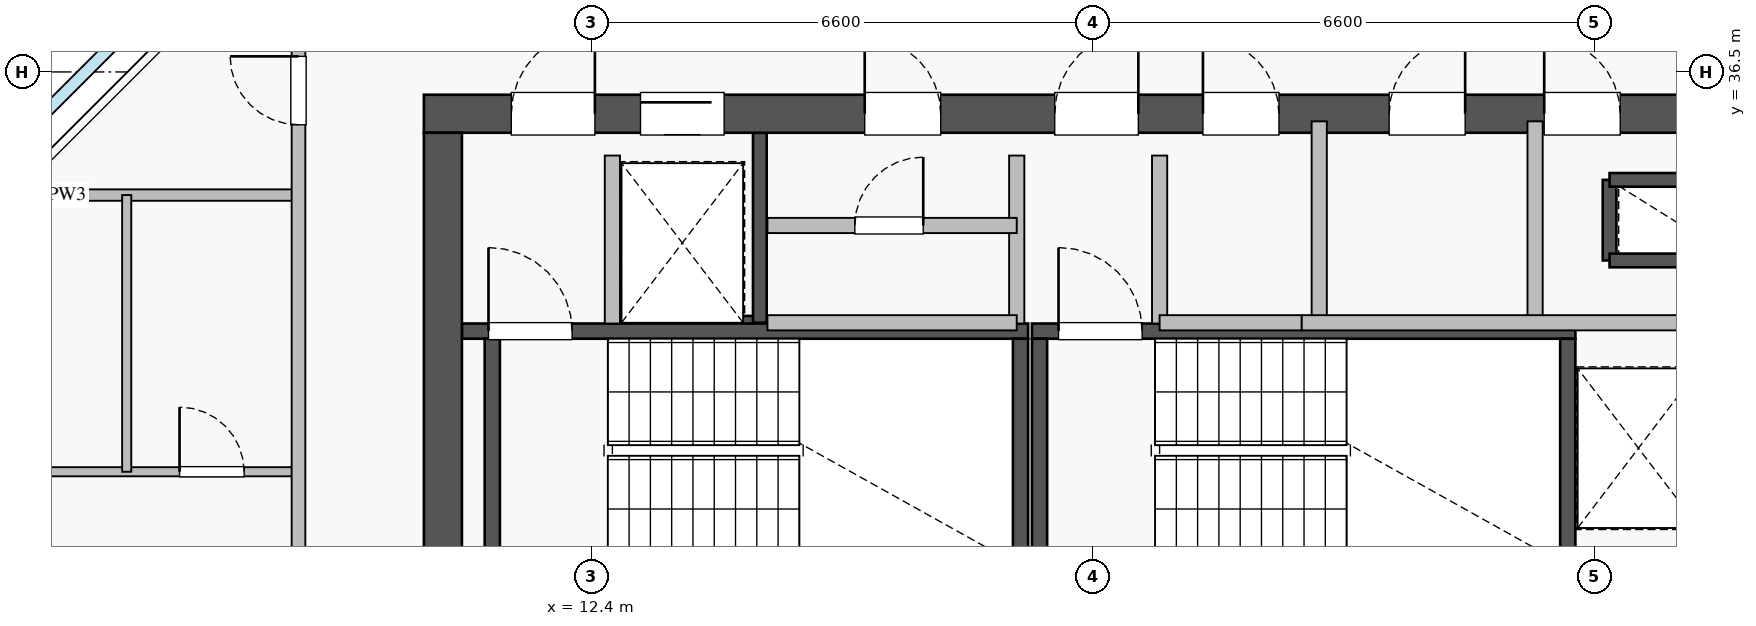
"""IFC4 building model, lengths in metres.
Left out: names, types, materials, properties, quantities, classifications, styles, units other than length and angle.
Written with IfcOpenShell. Run it as: python <this file> out.ifc"""

import sys

from ifc_helpers import new_model, si_unit, direction, frame, frame_2d, origin, place, context, subcontext, project, spatial, rectangle, extrude, source, transform, mapped, element, fill, save


model = new_model("IFC4")
c1 = context("Model", 3, precision=1e-05, world=origin(), true_north=direction((0.0, 1.0)))
c2 = subcontext(c1, "Body", "Model", "MODEL_VIEW")
j1 = project(units=[si_unit("LENGTHUNIT", "METRE"), si_unit("PLANEANGLEUNIT", "RADIAN")], contexts=[c1])
p1 = place(None, origin())
s1 = spatial("IfcSite", under=j1, at=p1, CompositionType="ELEMENT")
p2 = place(p1, origin())
s2 = spatial("IfcBuilding", under=s1, at=p2, CompositionType="ELEMENT")
p3 = place(p2, frame((0.0, 0.0, 200.25)))
s3 = spatial("IfcBuildingStorey", under=s2, at=p3, CompositionType="ELEMENT", Elevation=200.25)
p4 = place(p3, frame((12.68, 33.2, 0.0), z_axis=(0.0, 0.0, 1.0), x_axis=(1.0, 0.0, 0.0)))
e1 = element("IfcWall", 1, at=p4, inside=s3, PredefinedType="SHEAR", context=c2, shape_type="SweptSolid", body=[
    extrude(rectangle(XDim=1.94, YDim=0.18, at=frame_2d((0.97, 0.0))), origin(), (0.0, 0.0, 1.0), 3.07),
])
p5 = place(p3, frame((14.62, 33.2, 0.0), z_axis=(0.0, 0.0, 1.0), x_axis=(0.0, 1.0, 0.0)))
e2 = element("IfcWall", 2, at=p5, inside=s3, PredefinedType="SHEAR", context=c2, shape_type="SweptSolid", body=[
    extrude(rectangle(XDim=2.5, YDim=0.18, at=frame_2d((1.25, 0.0))), origin(), (0.0, 0.0, 1.0), 3.07),
])
p6 = place(p3, frame((25.8, 34.02, 0.0), z_axis=(0.0, 0.0, 1.0), x_axis=(0.0, 1.0, 0.0)))
e3 = element("IfcWall", 3, at=p6, inside=s3, PredefinedType="SHEAR", context=c2, shape_type="SweptSolid", body=[
    extrude(rectangle(XDim=1.06, YDim=0.18, at=frame_2d((0.53, 0.0))), origin(), (0.0, 0.0, 1.0), 3.07),
])
for number, where, z_axis, x_axis in (
    (4, (25.8, 35.08, 0.0), (0.0, 0.0, 1.0), (1.0, 0.0, 0.0)),
    (5, (25.8, 34.02, 0.0), (0.0, 0.0, 1.0), (1.0, 0.0, 0.0)),
):
    element("IfcWall", number, at=place(p3, frame(where, z_axis=z_axis, x_axis=x_axis)), inside=s3, PredefinedType="SHEAR", context=c2, shape_type="SweptSolid", body=[
        extrude(rectangle(XDim=1.5, YDim=0.18, at=frame_2d((0.75, 0.0))), origin(), (0.0, 0.0, 1.0), 3.07),
    ])
p7 = place(p3, frame((10.7, 33.09, 0.0), z_axis=(0.0, 0.0, 1.0), x_axis=(1.0, 0.0, 0.0)))
e6 = element("IfcWall", 6, at=p7, inside=s3, PredefinedType="SHEAR", context=c2, shape_type="SweptSolid", body=[
    extrude(rectangle(XDim=7.45, YDim=0.2, at=frame_2d((3.725, 0.0))), origin(), (0.0, 0.0, 1.0), 3.25),
])
p8 = place(p7, frame((0.35, 0.0, 0.0)))
e7 = element("IfcOpeningElement", 7, at=p8, cuts=e6, PredefinedType="OPENING", context=c2, shape_type="SweptSolid", body=[
    extrude(rectangle(XDim=1.1, YDim=2.05, at=frame_2d((0.55, 1.025))), frame((0.0, 0.11, 0.0), z_axis=(0.0, -1.0, 0.0), x_axis=(1.0, 0.0, 0.0)), (0.0, 0.0, 1.0), 0.22),
])
for number, where, z_axis, x_axis in (
    (8, (11.1, 30.05, 0.0), (0.0, 0.0, 1.0), (0.0, 1.0, 0.0)),
    (9, (18.05, 30.05, 0.0), (0.0, 0.0, 1.0), (0.0, 1.0, 0.0)),
):
    element("IfcWall", number, at=place(p3, frame(where, z_axis=z_axis, x_axis=x_axis)), inside=s3, PredefinedType="SHEAR", context=c2, shape_type="SweptSolid", body=[
        extrude(rectangle(XDim=2.94, YDim=0.2, at=frame_2d((1.47, 0.0))), origin(), (0.0, 0.0, 1.0), 3.25),
    ])
p9 = place(p3, frame((18.2, 33.09, 0.0), z_axis=(0.0, 0.0, 1.0), x_axis=(1.0, 0.0, 0.0)))
e10 = element("IfcWall", 10, at=p9, inside=s3, PredefinedType="SHEAR", context=c2, shape_type="SweptSolid", body=[
    extrude(rectangle(XDim=7.15, YDim=0.2, at=frame_2d((3.575, 0.0))), origin(), (0.0, 0.0, 1.0), 3.25),
])
p10 = place(p9, frame((0.35, 0.0, 0.0)))
e11 = element("IfcOpeningElement", 11, at=p10, cuts=e10, PredefinedType="OPENING", context=c2, shape_type="SweptSolid", body=[
    extrude(rectangle(XDim=1.1, YDim=2.05, at=frame_2d((0.55, 1.025))), frame((0.0, 0.11, 0.0), z_axis=(0.0, -1.0, 0.0), x_axis=(1.0, 0.0, 0.0)), (0.0, 0.0, 1.0), 0.22),
])
for number, where, z_axis, x_axis in (
    (12, (18.3, 30.05, 0.0), (0.0, 0.0, 1.0), (0.0, 1.0, 0.0)),
    (13, (25.25, 30.05, 0.0), (0.0, 0.0, 1.0), (0.0, 1.0, 0.0)),
):
    element("IfcWall", number, at=place(p3, frame(where, z_axis=z_axis, x_axis=x_axis)), inside=s3, PredefinedType="SHEAR", context=c2, shape_type="SweptSolid", body=[
        extrude(rectangle(XDim=2.94, YDim=0.2, at=frame_2d((1.47, 0.0))), origin(), (0.0, 0.0, 1.0), 3.25),
    ])
p11 = place(p3, frame((10.2, 35.95, 0.0), z_axis=(0.0, 0.0, 1.0), x_axis=(1.0, 0.0, 0.0)))
e14 = element("IfcWall", 14, at=p11, inside=s3, PredefinedType="SHEAR", context=c2, shape_type="SweptSolid", body=[
    extrude(rectangle(XDim=17.6, YDim=0.5, at=frame_2d((8.8, 0.0))), origin(), (0.0, 0.0, 1.0), 3.25),
])
p12 = place(p11, frame((1.15, 0.0, 0.0)))
e15 = element("IfcOpeningElement", 15, at=p12, cuts=e14, PredefinedType="OPENING", context=c2, shape_type="SweptSolid", body=[
    extrude(rectangle(XDim=1.1, YDim=2.05, at=frame_2d((0.55, 1.025))), frame((0.0, 0.26, 0.0), z_axis=(0.0, -1.0, 0.0), x_axis=(1.0, 0.0, 0.0)), (0.0, 0.0, 1.0), 0.52),
])
p13 = place(p11, frame((8.3, 0.0, 0.0)))
e16 = element("IfcOpeningElement", 16, at=p13, cuts=e14, PredefinedType="OPENING", context=c2, shape_type="SweptSolid", body=[
    extrude(rectangle(XDim=1.1, YDim=2.05, at=frame_2d((0.55, 1.025))), frame((0.0, 0.26, 0.0), z_axis=(0.0, -1.0, 0.0), x_axis=(1.0, 0.0, 0.0)), (0.0, 0.0, 1.0), 0.52),
])
p14 = place(p11, frame((2.85, 0.0, 0.0)))
e17 = element("IfcOpeningElement", 17, at=p14, cuts=e14, PredefinedType="OPENING", context=c2, shape_type="SweptSolid", body=[
    extrude(rectangle(XDim=1.1, YDim=2.05, at=frame_2d((0.55, 1.025))), frame((0.0, 0.26, 0.0), z_axis=(0.0, -1.0, 0.0), x_axis=(1.0, 0.0, 0.0)), (0.0, 0.0, 1.0), 0.52),
])
p15 = place(p11, frame((5.8, 0.0, 0.0)))
e18 = element("IfcOpeningElement", 18, at=p15, cuts=e14, PredefinedType="OPENING", context=c2, shape_type="SweptSolid", body=[
    extrude(rectangle(XDim=1.0, YDim=2.05, at=frame_2d((0.5, 1.025))), frame((0.0, 0.26, 0.0), z_axis=(0.0, -1.0, 0.0), x_axis=(1.0, 0.0, 0.0)), (0.0, 0.0, 1.0), 0.52),
])
p16 = place(p11, frame((14.74, 0.0, 0.0)))
e19 = element("IfcOpeningElement", 19, at=p16, cuts=e14, PredefinedType="OPENING", context=c2, shape_type="SweptSolid", body=[
    extrude(rectangle(XDim=1.0, YDim=2.05, at=frame_2d((0.5, 1.025))), frame((0.0, 0.26, 0.0), z_axis=(0.0, -1.0, 0.0), x_axis=(1.0, 0.0, 0.0)), (0.0, 0.0, 1.0), 0.52),
])
p17 = place(p11, frame((10.25, 0.0, 0.0)))
e20 = element("IfcOpeningElement", 20, at=p17, cuts=e14, PredefinedType="OPENING", context=c2, shape_type="SweptSolid", body=[
    extrude(rectangle(XDim=1.0, YDim=2.05, at=frame_2d((0.5, 1.025))), frame((0.0, 0.26, 0.0), z_axis=(0.0, -1.0, 0.0), x_axis=(1.0, 0.0, 0.0)), (0.0, 0.0, 1.0), 0.52),
])
p18 = place(p11, frame((12.7, 0.0, 0.0)))
e21 = element("IfcOpeningElement", 21, at=p18, cuts=e14, PredefinedType="OPENING", context=c2, shape_type="SweptSolid", body=[
    extrude(rectangle(XDim=1.0, YDim=2.05, at=frame_2d((0.5, 1.025))), frame((0.0, 0.26, 0.0), z_axis=(0.0, -1.0, 0.0), x_axis=(1.0, 0.0, 0.0)), (0.0, 0.0, 1.0), 0.52),
])
p19 = place(p3, frame((10.45, 29.5, 0.0), z_axis=(0.0, 0.0, 1.0), x_axis=(0.0, 1.0, 0.0)))
e22 = element("IfcWall", 22, at=p19, inside=s3, PredefinedType="SHEAR", context=c2, shape_type="SweptSolid", body=[
    extrude(rectangle(XDim=6.2, YDim=0.5, at=frame_2d((3.1, 0.0))), origin(), (0.0, 0.0, 1.0), 3.25),
])
for number, where, z_axis, x_axis in (
    (23, (12.68, 33.19, 0.0), (0.0, 0.0, 1.0), (0.0, 1.0, 0.0)),
    (24, (18.0, 33.19, 0.0), (0.0, 0.0, 1.0), (0.0, 1.0, 0.0)),
    (25, (19.88, 33.19, 0.0), (0.0, 0.0, 1.0), (0.0, 1.0, 0.0)),
):
    element("IfcWall", number, at=place(p3, frame(where, z_axis=z_axis, x_axis=x_axis)), inside=s3, PredefinedType="PARTITIONING", context=c2, shape_type="SweptSolid", body=[
        extrude(rectangle(XDim=2.21, YDim=0.2, at=frame_2d((1.105, 0.0))), origin(), (0.0, 0.0, 1.0), 3.07),
    ])
p20 = place(p3, frame((14.72, 34.48, 0.0), z_axis=(0.0, 0.0, 1.0), x_axis=(1.0, 0.0, 0.0)))
e26 = element("IfcWall", 26, at=p20, inside=s3, PredefinedType="PARTITIONING", context=c2, shape_type="SweptSolid", body=[
    extrude(rectangle(XDim=3.28, YDim=0.2, at=frame_2d((1.64, 0.0))), origin(), (0.0, 0.0, 1.0), 3.07),
])
p21 = place(p20, frame((1.15, 0.0, 0.0)))
e27 = element("IfcOpeningElement", 27, at=p21, cuts=e26, PredefinedType="OPENING", context=c2, shape_type="SweptSolid", body=[
    extrude(rectangle(XDim=0.9, YDim=2.05, at=frame_2d((0.45, 1.025))), frame((0.0, 0.11, 0.0), z_axis=(0.0, -1.0, 0.0), x_axis=(1.0, 0.0, 0.0)), (0.0, 0.0, 1.0), 0.22),
])
p22 = place(p3, frame((14.72, 33.2, 0.0), z_axis=(0.0, 0.0, 1.0), x_axis=(1.0, 0.0, 0.0)))
e28 = element("IfcWall", 28, at=p22, inside=s3, PredefinedType="PARTITIONING", context=c2, shape_type="SweptSolid", body=[
    extrude(rectangle(XDim=3.28, YDim=0.2, at=frame_2d((1.64, 0.0))), origin(), (0.0, 0.0, 1.0), 3.07),
])
p23 = place(p3, frame((24.82, 33.2, 0.0), z_axis=(0.0, 0.0, 1.0), x_axis=(0.0, 1.0, 0.0)))
e29 = element("IfcWall", 29, at=p23, inside=s3, PredefinedType="PARTITIONING", context=c2, shape_type="SweptSolid", body=[
    extrude(rectangle(XDim=2.65, YDim=0.2, at=frame_2d((1.325, 0.0))), origin(), (0.0, 0.0, 1.0), 3.07),
])
p24 = place(p3, frame((19.88, 33.2, 0.0), z_axis=(0.0, 0.0, 1.0), x_axis=(1.0, 0.0, 0.0)))
e30 = element("IfcWall", 30, at=p24, inside=s3, PredefinedType="PARTITIONING", context=c2, shape_type="SweptSolid", body=[
    extrude(rectangle(XDim=1.87, YDim=0.2, at=frame_2d((0.935, 0.0))), origin(), (0.0, 0.0, 1.0), 3.07),
])
p25 = place(p3, frame((21.98, 33.2, 0.0), z_axis=(0.0, 0.0, 1.0), x_axis=(0.0, 1.0, 0.0)))
e31 = element("IfcWall", 31, at=p25, inside=s3, PredefinedType="PARTITIONING", context=c2, shape_type="SweptSolid", body=[
    extrude(rectangle(XDim=2.65, YDim=0.2, at=frame_2d((1.325, 0.0))), origin(), (0.0, 0.0, 1.0), 3.07),
])
p26 = place(p3, frame((21.75, 33.2, 0.0), z_axis=(0.0, 0.0, 1.0), x_axis=(1.0, 0.0, 0.0)))
e32 = element("IfcWall", 32, at=p26, inside=s3, PredefinedType="PARTITIONING", context=c2, shape_type="SweptSolid", body=[
    extrude(rectangle(XDim=5.17, YDim=0.2, at=frame_2d((2.585, 0.0))), origin(), (0.0, 0.0, 1.0), 3.07),
])
p27 = place(p3, frame((2.45, 34.88, 0.0), z_axis=(0.0, 0.0, 1.0), x_axis=(1.0, 0.0, 0.0)))
e33 = element("IfcWall", 33, at=p27, inside=s3, PredefinedType="PARTITIONING", context=c2, shape_type="SweptSolid", body=[
    extrude(rectangle(XDim=6.1, YDim=0.15, at=frame_2d((3.05, 0.0))), origin(), (0.0, 0.0, 1.0), 3.07),
])
p28 = place(p3, frame((2.45, 31.24, 0.0), z_axis=(0.0, 0.0, 1.0), x_axis=(1.0, 0.0, 0.0)))
e34 = element("IfcWall", 34, at=p28, inside=s3, PredefinedType="PLUMBINGWALL", context=c2, shape_type="SweptSolid", body=[
    extrude(rectangle(XDim=6.1, YDim=0.12, at=frame_2d((3.05, 0.0))), origin(), (0.0, 0.0, 1.0), 3.07),
])
p29 = place(p28, frame((1.48, 0.0, 0.0)))
e35 = element("IfcOpeningElement", 35, at=p29, cuts=e34, PredefinedType="OPENING", context=c2, shape_type="SweptSolid", body=[
    extrude(rectangle(XDim=0.9, YDim=2.05, at=frame_2d((0.45, 1.025))), frame((0.0, 0.07, 0.0), z_axis=(0.0, -1.0, 0.0), x_axis=(1.0, 0.0, 0.0)), (0.0, 0.0, 1.0), 0.14),
])
p30 = place(p28, frame((4.535, 0.0, 0.0)))
e36 = element("IfcOpeningElement", 36, at=p30, cuts=e34, PredefinedType="OPENING", context=c2, shape_type="SweptSolid", body=[
    extrude(rectangle(XDim=0.85, YDim=2.05, at=frame_2d((0.425, 1.025))), frame((0.0, 0.07, 0.0), z_axis=(0.0, -1.0, 0.0), x_axis=(1.0, 0.0, 0.0)), (0.0, 0.0, 1.0), 0.14),
])
p31 = place(p3, frame((6.29, 31.24, 0.0), z_axis=(0.0, 0.0, 1.0), x_axis=(0.0, 1.0, 0.0)))
e37 = element("IfcWall", 37, at=p31, inside=s3, PredefinedType="PLUMBINGWALL", context=c2, shape_type="SweptSolid", body=[
    extrude(rectangle(XDim=3.64, YDim=0.12, at=frame_2d((1.82, 0.0))), origin(), (0.0, 0.0, 1.0), 3.07),
])
p32 = place(p3, frame((8.55, 6.2, 0.0), z_axis=(0.0, 0.0, 1.0), x_axis=(0.0, 1.0, 0.0)))
e38 = element("IfcWall", 38, at=p32, inside=s3, PredefinedType="PARTITIONING", context=c2, shape_type="SweptSolid", body=[
    extrude(rectangle(XDim=33.6, YDim=0.18, at=frame_2d((16.8, 0.0))), origin(), (0.0, 0.0, 1.0), 3.07),
])
p33 = place(p32, frame((29.605, 0.0, 0.0)))
e39 = element("IfcOpeningElement", 39, at=p33, cuts=e38, PredefinedType="OPENING", context=c2, shape_type="SweptSolid", body=[
    extrude(rectangle(XDim=0.9, YDim=2.05, at=frame_2d((0.45, 1.025))), frame((0.0, 0.1, 0.0), z_axis=(0.0, -1.0, 0.0), x_axis=(1.0, 0.0, 0.0)), (0.0, 0.0, 1.0), 0.2),
])
p34 = place(p32, frame((2.92, 0.0, 0.0)))
e40 = element("IfcOpeningElement", 40, at=p34, cuts=e38, PredefinedType="OPENING", context=c2, shape_type="SweptSolid", body=[
    extrude(rectangle(XDim=0.9, YDim=2.05, at=frame_2d((0.45, 1.025))), frame((0.0, 0.1, 0.0), z_axis=(0.0, -1.0, 0.0), x_axis=(1.0, 0.0, 0.0)), (0.0, 0.0, 1.0), 0.2),
])
p35 = place(p32, frame((6.48, 0.0, 0.0)))
e41 = element("IfcOpeningElement", 41, at=p35, cuts=e38, PredefinedType="OPENING", context=c2, shape_type="SweptSolid", body=[
    extrude(rectangle(XDim=1.0, YDim=2.05, at=frame_2d((0.5, 1.025))), frame((0.0, 0.1, 0.0), z_axis=(0.0, -1.0, 0.0), x_axis=(1.0, 0.0, 0.0)), (0.0, 0.0, 1.0), 0.2),
])
p36 = place(p32, frame((16.51, 0.0, 0.0)))
e42 = element("IfcOpeningElement", 42, at=p36, cuts=e38, PredefinedType="OPENING", context=c2, shape_type="SweptSolid", body=[
    extrude(rectangle(XDim=1.0, YDim=2.05, at=frame_2d((0.5, 1.025))), frame((0.0, 0.1, 0.0), z_axis=(0.0, -1.0, 0.0), x_axis=(1.0, 0.0, 0.0)), (0.0, 0.0, 1.0), 0.2),
])
p37 = place(p32, frame((22.21, 0.0, 0.0)))
e43 = element("IfcOpeningElement", 43, at=p37, cuts=e38, PredefinedType="OPENING", context=c2, shape_type="SweptSolid", body=[
    extrude(rectangle(XDim=1.0, YDim=2.05, at=frame_2d((0.5, 1.025))), frame((0.0, 0.1, 0.0), z_axis=(0.0, -1.0, 0.0), x_axis=(1.0, 0.0, 0.0)), (0.0, 0.0, 1.0), 0.2),
])
m1 = source(origin(), c2, "Body", "SweptSolid", [
    extrude(rectangle(XDim=1.1, YDim=2.05, at=frame_2d((0.55, 1.025))), frame((0.0, 0.025, 0.0), z_axis=(0.0, -1.0, 0.0), x_axis=(1.0, 0.0, 0.0)), (0.0, 0.0, 1.0), 0.05),
])
p38 = place(p12, origin())
e44 = element("IfcDoor", 44, at=p38, inside=s3, OperationType="SINGLE_SWING_RIGHT", PredefinedType="DOOR", context=c2, shape_type="MappedRepresentation", body=[
    mapped(m1, transform((0.0, 0.0, 0.0), x_axis=(1.0, 0.0, 0.0), y_axis=(0.0, 1.0, 0.0), z_axis=(0.0, 0.0, 1.0), scale=1.0)),
])
fill(e15, e44)
p39 = place(p8, origin())
e45 = element("IfcDoor", 45, at=p39, inside=s3, OperationType="SINGLE_SWING_LEFT", PredefinedType="DOOR", context=c2, shape_type="MappedRepresentation", body=[
    mapped(m1, transform((0.0, 0.0, 0.0), x_axis=(1.0, 0.0, 0.0), y_axis=(0.0, 1.0, 0.0), z_axis=(0.0, 0.0, 1.0), scale=1.0)),
])
fill(e7, e45)
p40 = place(p13, origin())
e46 = element("IfcDoor", 46, at=p40, inside=s3, OperationType="SINGLE_SWING_RIGHT", PredefinedType="DOOR", context=c2, shape_type="MappedRepresentation", body=[
    mapped(m1, transform((0.0, 0.0, 0.0), x_axis=(1.0, 0.0, 0.0), y_axis=(0.0, 1.0, 0.0), z_axis=(0.0, 0.0, 1.0), scale=1.0)),
])
fill(e16, e46)
p41 = place(p10, origin())
e47 = element("IfcDoor", 47, at=p41, inside=s3, OperationType="SINGLE_SWING_LEFT", PredefinedType="DOOR", context=c2, shape_type="MappedRepresentation", body=[
    mapped(m1, transform((0.0, 0.0, 0.0), x_axis=(1.0, 0.0, 0.0), y_axis=(0.0, 1.0, 0.0), z_axis=(0.0, 0.0, 1.0), scale=1.0)),
])
fill(e11, e47)
p42 = place(p14, origin())
e48 = element("IfcDoor", 48, at=p42, inside=s3, OperationType="SLIDING_TO_LEFT", PredefinedType="DOOR", context=c2, shape_type="MappedRepresentation", body=[
    mapped(m1, transform((0.0, 0.0, 0.0), x_axis=(1.0, 0.0, 0.0), y_axis=(0.0, 1.0, 0.0), z_axis=(0.0, 0.0, 1.0), scale=1.0)),
])
fill(e17, e48)
m2 = source(origin(), c2, "Body", "SweptSolid", [
    extrude(rectangle(XDim=1.0, YDim=2.05, at=frame_2d((0.5, 1.025))), frame((0.0, 0.025, 0.0), z_axis=(0.0, -1.0, 0.0), x_axis=(1.0, 0.0, 0.0)), (0.0, 0.0, 1.0), 0.05),
])
p43 = place(p15, origin())
e49 = element("IfcDoor", 49, at=p43, inside=s3, OperationType="SINGLE_SWING_LEFT", PredefinedType="DOOR", context=c2, shape_type="MappedRepresentation", body=[
    mapped(m2, transform((0.0, 0.0, 0.0), x_axis=(1.0, 0.0, 0.0), y_axis=(0.0, 1.0, 0.0), z_axis=(0.0, 0.0, 1.0), scale=1.0)),
])
fill(e18, e49)
p44 = place(p16, origin())
e50 = element("IfcDoor", 50, at=p44, inside=s3, OperationType="SINGLE_SWING_LEFT", PredefinedType="DOOR", context=c2, shape_type="MappedRepresentation", body=[
    mapped(m2, transform((0.0, 0.0, 0.0), x_axis=(1.0, 0.0, 0.0), y_axis=(0.0, 1.0, 0.0), z_axis=(0.0, 0.0, 1.0), scale=1.0)),
])
fill(e19, e50)
p45 = place(p17, origin())
e51 = element("IfcDoor", 51, at=p45, inside=s3, OperationType="SINGLE_SWING_LEFT", PredefinedType="DOOR", context=c2, shape_type="MappedRepresentation", body=[
    mapped(m2, transform((0.0, 0.0, 0.0), x_axis=(1.0, 0.0, 0.0), y_axis=(0.0, 1.0, 0.0), z_axis=(0.0, 0.0, 1.0), scale=1.0)),
])
fill(e20, e51)
p46 = place(p18, origin())
e52 = element("IfcDoor", 52, at=p46, inside=s3, OperationType="SINGLE_SWING_RIGHT", PredefinedType="DOOR", context=c2, shape_type="MappedRepresentation", body=[
    mapped(m2, transform((0.0, 0.0, 0.0), x_axis=(1.0, 0.0, 0.0), y_axis=(0.0, 1.0, 0.0), z_axis=(0.0, 0.0, 1.0), scale=1.0)),
])
fill(e21, e52)
m3 = source(origin(), c2, "Body", "SweptSolid", [
    extrude(rectangle(XDim=0.9, YDim=2.05, at=frame_2d((0.45, 1.025))), frame((0.0, 0.025, 0.0), z_axis=(0.0, -1.0, 0.0), x_axis=(1.0, 0.0, 0.0)), (0.0, 0.0, 1.0), 0.05),
])
p47 = place(p21, origin())
e53 = element("IfcDoor", 53, at=p47, inside=s3, OperationType="SINGLE_SWING_RIGHT", PredefinedType="DOOR", context=c2, shape_type="MappedRepresentation", body=[
    mapped(m3, transform((0.0, 0.0, 0.0), x_axis=(1.0, 0.0, 0.0), y_axis=(0.0, 1.0, 0.0), z_axis=(0.0, 0.0, 1.0), scale=1.0)),
])
fill(e27, e53)
m4 = source(origin(), c2, "Body", "SweptSolid", [
    extrude(rectangle(XDim=0.85, YDim=2.05, at=frame_2d((0.425, 1.025))), frame((0.0, 0.025, 0.0), z_axis=(0.0, -1.0, 0.0), x_axis=(1.0, 0.0, 0.0)), (0.0, 0.0, 1.0), 0.05),
])
p48 = place(p30, origin())
e54 = element("IfcDoor", 54, at=p48, inside=s3, OperationType="SINGLE_SWING_LEFT", PredefinedType="DOOR", context=c2, shape_type="MappedRepresentation", body=[
    mapped(m4, transform((0.0, 0.0, 0.0), x_axis=(1.0, 0.0, 0.0), y_axis=(0.0, 1.0, 0.0), z_axis=(0.0, 0.0, 1.0), scale=1.0)),
])
fill(e36, e54)
p49 = place(p33, origin())
e55 = element("IfcDoor", 55, at=p49, inside=s3, OperationType="SINGLE_SWING_RIGHT", PredefinedType="DOOR", context=c2, shape_type="MappedRepresentation", body=[
    mapped(m3, transform((0.0, 0.0, 0.0), x_axis=(1.0, 0.0, 0.0), y_axis=(0.0, 1.0, 0.0), z_axis=(0.0, 0.0, 1.0), scale=1.0)),
])
fill(e39, e55)
save(model, sys.argv[1])
